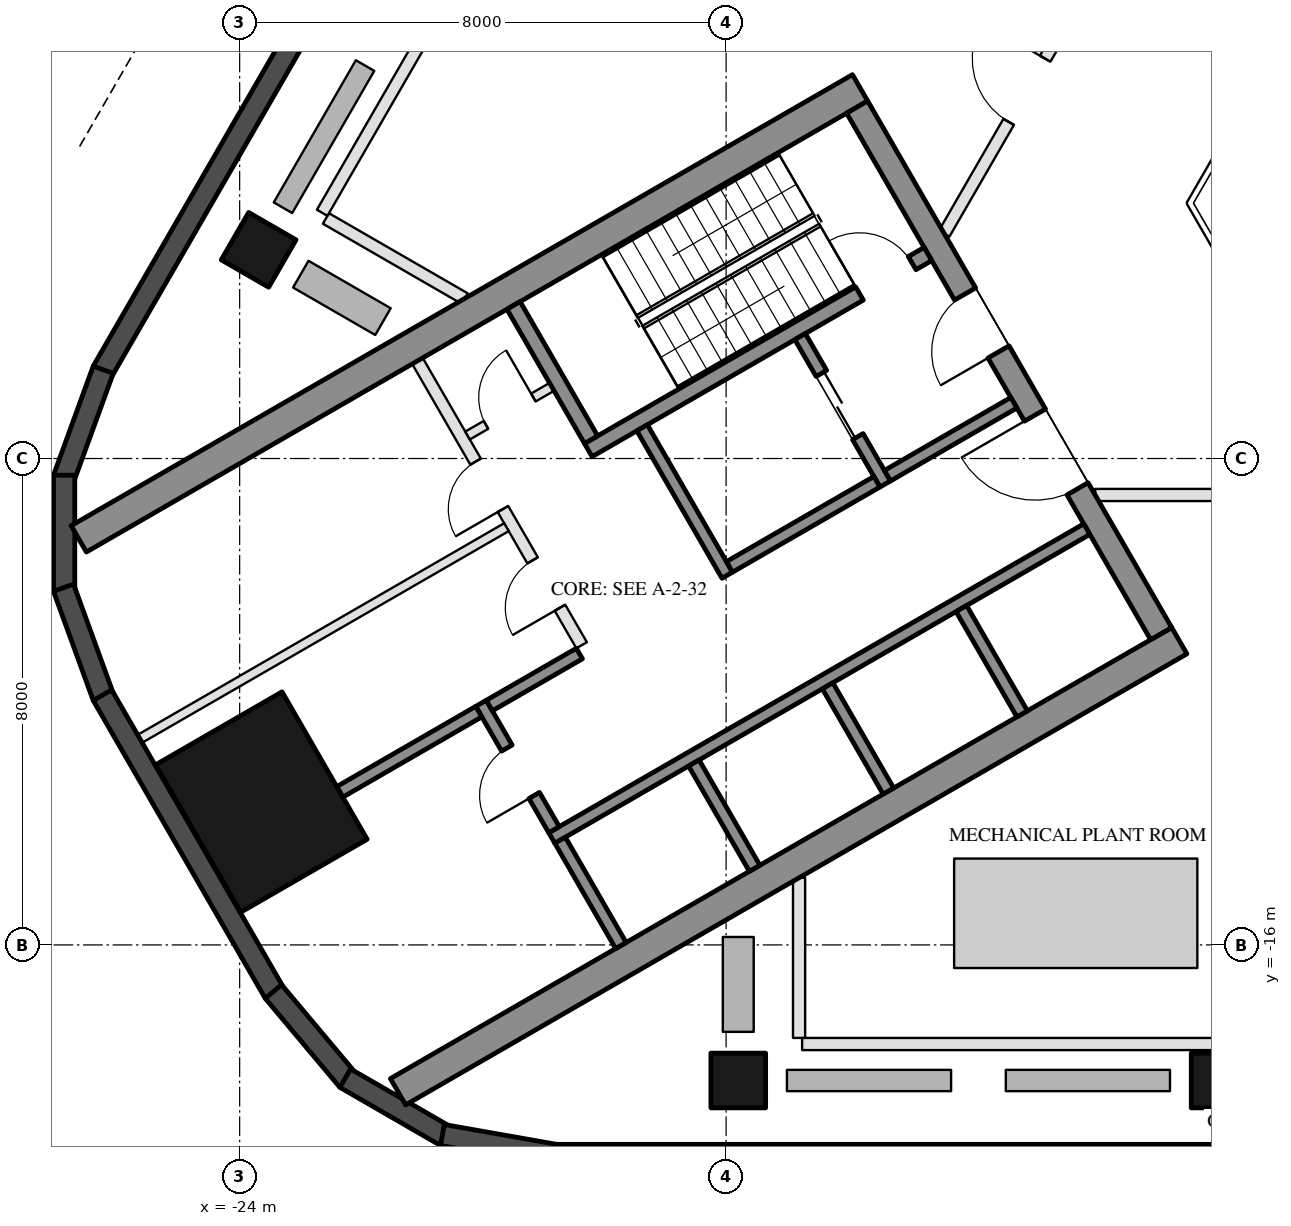
"""IFC4 building model, lengths in metres.
Left out: names, types, materials, properties, quantities, classifications, styles, units other than length and angle.
Written with IfcOpenShell. Run it as: python <this file> out.ifc"""

import sys

from ifc_helpers import new_model, si_unit, direction, frame, frame_2d, origin, origin_2d, place, context, subcontext, project, spatial, rectangle, hollow_rectangle, extrude, element, fill, save


model = new_model("IFC4")
c1 = context("Model", 3, precision=1e-05, world=origin(), true_north=direction((0.0, 1.0)))
c2 = subcontext(c1, "Body", "Model", "MODEL_VIEW")
j1 = project(units=[si_unit("LENGTHUNIT", "METRE"), si_unit("PLANEANGLEUNIT", "RADIAN")], contexts=[c1])
p1 = place(None, origin())
s1 = spatial("IfcSite", under=j1, at=p1, CompositionType="ELEMENT")
p2 = place(p1, origin())
s2 = spatial("IfcBuilding", under=s1, at=p2, CompositionType="ELEMENT")
p3 = place(p2, frame((0.0, 0.0, 142.1)))
s3 = spatial("IfcBuildingStorey", under=s2, at=p3, CompositionType="ELEMENT", Elevation=142.1)
for number, where, z_axis, x_axis in (
    (1, (-15.8, -18.23, 0.0), (0.0, 0.0, 1.0), (-1.0, 0.0, 0.0)),
    (2, (-7.9, -18.23, 0.0), (0.0, 0.0, 1.0), (-1.0, 0.0, 0.0)),
    (3, (-23.688, -4.568, 0.0), (0.0, 0.0, 1.0), (0.5, 0.866, 0.0)),
):
    element("IfcColumn", number, at=place(p3, frame(where, z_axis=z_axis, x_axis=x_axis)), inside=s3, PredefinedType="COLUMN", context=c2, shape_type="SweptSolid", body=[
        extrude(hollow_rectangle(XDim=0.9, YDim=0.9, WallThickness=0.04, at=origin_2d()), origin(), (0.0, 0.0, 1.0), 4.5),
    ])
p4 = place(p3, frame((-23.643, -13.65, 0.0), z_axis=(0.0, 0.0, 1.0), x_axis=(-0.5, 0.866025403784, 0.0)))
e4 = element("IfcColumn", 4, at=p4, inside=s3, PredefinedType="COLUMN", context=c2, shape_type="SweptSolid", body=[
    extrude(hollow_rectangle(XDim=2.8, YDim=2.4, WallThickness=0.07, at=origin_2d()), origin(), (0.0, 0.0, 1.0), 4.5),
])
p5 = place(p3, frame((-7.441, 26.022, 0.0), z_axis=(0.0, 0.0, 1.0), x_axis=(-0.499998380999, -0.866026338513, 0.0)))
e5 = element("IfcWall", 5, at=p5, inside=s3, PredefinedType="SOLIDWALL", context=c2, shape_type="SweptSolid", body=[
    extrude(rectangle(XDim=37.631, YDim=0.35, at=frame_2d((18.816, 0.0))), origin(), (0.0, 0.0, 1.0), 4.35),
])
for number, where, z_axis, x_axis in (
    (6, (-26.244, -6.54, 0.0), (0.0, 0.0, 1.0), (-0.342, -0.94, 0.0)),
    (7, (-26.886, -8.275, 0.0), (0.0, 0.0, 1.0), (0.0, -1.0, 0.0)),
    (8, (-26.897, -10.125, 0.0), (0.0, 0.0, 1.0), (0.342, -0.94, 0.0)),
):
    element("IfcWall", number, at=place(p3, frame(where, z_axis=z_axis, x_axis=x_axis)), inside=s3, PredefinedType="SOLIDWALL", context=c2, shape_type="SweptSolid", body=[
        extrude(rectangle(XDim=1.91, YDim=0.35, at=frame_2d((0.955, 0.0))), origin(), (0.0, 0.0, 1.0), 4.35),
    ])
p6 = place(p3, frame((-26.256, -11.893, 0.0), z_axis=(0.0, 0.0, 1.0), x_axis=(0.499986410639, -0.866033249463, 0.0)))
e9 = element("IfcWall", 9, at=p6, inside=s3, PredefinedType="SOLIDWALL", context=c2, shape_type="SweptSolid", body=[
    extrude(rectangle(XDim=5.658, YDim=0.35, at=frame_2d((2.829, 0.0))), origin(), (0.0, 0.0, 1.0), 4.35),
])
for number, where, z_axis, x_axis in (
    (10, (-23.445, -16.768, 0.0), (0.0, 0.0, 1.0), (0.643, -0.766, 0.0)),
    (11, (-22.264, -18.192, 0.0), (0.0, 0.0, 1.0), (0.866, -0.5, 0.0)),
):
    element("IfcWall", number, at=place(p3, frame(where, z_axis=z_axis, x_axis=x_axis)), inside=s3, PredefinedType="SOLIDWALL", context=c2, shape_type="SweptSolid", body=[
        extrude(rectangle(XDim=1.91, YDim=0.35, at=frame_2d((0.955, 0.0))), origin(), (0.0, 0.0, 1.0), 4.35),
    ])
p7 = place(p3, frame((-20.667, -19.126, 0.0), z_axis=(0.0, 0.0, 1.0), x_axis=(0.984798995425, -0.173697837091, 0.0)))
e12 = element("IfcWall", 12, at=p7, inside=s3, PredefinedType="SOLIDWALL", context=c2, shape_type="SweptSolid", body=[
    extrude(rectangle(XDim=1.91, YDim=0.35, at=frame_2d((0.955, 0.0))), origin(), (0.0, 0.0, 1.0), 4.35),
])
p8 = place(p3, frame((-18.816, -19.455, 0.0), z_axis=(0.0, 0.0, 1.0), x_axis=(1.0, 0.0, 0.0)))
e13 = element("IfcWall", 13, at=p8, inside=s3, PredefinedType="SOLIDWALL", context=c2, shape_type="SweptSolid", body=[
    extrude(rectangle(XDim=37.632, YDim=0.35, at=frame_2d((18.816, 0.0))), origin(), (0.0, 0.0, 1.0), 4.35),
])
for number, where, z_axis, x_axis in (
    (14, (-13.797, -1.903, 0.0), (0.0, 0.0, 1.0), (-0.866, -0.5, 0.0)),
    (15, (-8.547, -10.997, 0.0), (0.0, 0.0, 1.0), (-0.866, -0.5, 0.0)),
):
    element("IfcWall", number, at=place(p3, frame(where, z_axis=z_axis, x_axis=x_axis)), inside=s3, PredefinedType="SHEAR", context=c2, shape_type="SweptSolid", body=[
        extrude(rectangle(XDim=14.837, YDim=0.5, at=frame_2d((7.418, 0.0))), origin(), (0.0, 0.0, 1.0), 4.3),
    ])
p9 = place(p3, frame((-13.845, -2.22, 0.0), z_axis=(0.0, 0.0, 1.0), x_axis=(0.500004234368, -0.866022959057, 0.0)))
e16 = element("IfcWall", 16, at=p9, inside=s3, PredefinedType="SHEAR", context=c2, shape_type="SweptSolid", body=[
    extrude(rectangle(XDim=10.0, YDim=0.4, at=frame_2d((5.0, 0.0))), origin(), (0.0, 0.0, 1.0), 4.3),
])
p10 = place(p9, frame((3.55, 0.0, 0.0)))
e17 = element("IfcOpeningElement", 17, at=p10, cuts=e16, PredefinedType="OPENING", context=c2, shape_type="SweptSolid", body=[
    extrude(rectangle(XDim=1.1, YDim=2.1, at=frame_2d((0.55, 1.05))), frame((0.0, 0.21, 0.0), z_axis=(0.0, -1.0, 0.0), x_axis=(1.0, 0.0, 0.0)), (0.0, 0.0, 1.0), 0.42),
])
p11 = place(p9, frame((5.85, 0.0, 0.0)))
e18 = element("IfcOpeningElement", 18, at=p11, cuts=e16, PredefinedType="OPENING", context=c2, shape_type="SweptSolid", body=[
    extrude(rectangle(XDim=1.4, YDim=2.1, at=frame_2d((0.7, 1.05))), frame((0.0, 0.21, 0.0), z_axis=(0.0, -1.0, 0.0), x_axis=(1.0, 0.0, 0.0)), (0.0, 0.0, 1.0), 0.42),
])
p12 = place(p3, frame((-12.681, -4.636, 0.0), z_axis=(0.0, 0.0, 1.0), x_axis=(-0.866021702275, -0.500006411147, 0.0)))
e19 = element("IfcWall", 19, at=p12, inside=s3, PredefinedType="SHEAR", context=c2, shape_type="SweptSolid", body=[
    extrude(rectangle(XDim=6.45, YDim=0.25, at=frame_2d((3.225, 0.0))), origin(), (0.0, 0.0, 1.0), 4.3),
])
p13 = place(p12, frame((0.3, 0.0, 0.0)))
e20 = element("IfcOpeningElement", 20, at=p13, cuts=e19, PredefinedType="OPENING", context=c2, shape_type="SweptSolid", body=[
    extrude(rectangle(XDim=1.0, YDim=2.1, at=frame_2d((0.5, 1.05))), frame((0.0, 0.135, 0.0), z_axis=(0.0, -1.0, 0.0), x_axis=(1.0, 0.0, 0.0)), (0.0, 0.0, 1.0), 0.27),
])
p14 = place(p3, frame((-19.496, -5.482, 0.0), z_axis=(0.0, 0.0, 1.0), x_axis=(0.499990435942, -0.866030925526, 0.0)))
e21 = element("IfcWall", 21, at=p14, inside=s3, PredefinedType="SHEAR", context=c2, shape_type="SweptSolid", body=[
    extrude(rectangle(XDim=2.55, YDim=0.25, at=frame_2d((1.275, 0.0))), origin(), (0.0, 0.0, 1.0), 4.3),
])
p15 = place(p3, frame((-17.381, -7.495, 0.0), z_axis=(0.0, 0.0, 1.0), x_axis=(0.500011755427, -0.866018616679, 0.0)))
e22 = element("IfcWall", 22, at=p15, inside=s3, PredefinedType="SHEAR", context=c2, shape_type="SweptSolid", body=[
    extrude(rectangle(XDim=2.8, YDim=0.2, at=frame_2d((1.4, 0.0))), origin(), (0.0, 0.0, 1.0), 4.3),
])
p16 = place(p3, frame((-14.783, -5.995, 0.0), z_axis=(0.0, 0.0, 1.0), x_axis=(0.49994636267, -0.866056369097, 0.0)))
e23 = element("IfcWall", 23, at=p16, inside=s3, PredefinedType="SHEAR", context=c2, shape_type="SweptSolid", body=[
    extrude(rectangle(XDim=2.8, YDim=0.2, at=frame_2d((1.4, 0.0))), origin(), (0.0, 0.0, 1.0), 4.3),
])
p17 = place(p16, frame((0.7, 0.0, 0.0)))
e24 = element("IfcOpeningElement", 24, at=p17, cuts=e23, PredefinedType="OPENING", context=c2, shape_type="SweptSolid", body=[
    extrude(rectangle(XDim=1.2, YDim=2.1, at=frame_2d((0.6, 1.05))), frame((0.0, 0.11, 0.0), z_axis=(0.0, -1.0, 0.0), x_axis=(1.0, 0.0, 0.0)), (0.0, 0.0, 1.0), 0.22),
])
p18 = place(p3, frame((-13.52, -8.383, 0.0), z_axis=(0.0, 0.0, 1.0), x_axis=(-0.866034573852, -0.49998411664, 0.0)))
e25 = element("IfcWall", 25, at=p18, inside=s3, PredefinedType="SHEAR", context=c2, shape_type="SweptSolid", body=[
    extrude(rectangle(XDim=2.8, YDim=0.2, at=frame_2d((1.4, 0.0))), origin(), (0.0, 0.0, 1.0), 4.3),
])
p19 = place(p3, frame((-11.268, -7.083, 0.0), z_axis=(0.0, 0.0, 1.0), x_axis=(-0.866050077142, -0.499957262057, 0.0)))
e26 = element("IfcWall", 26, at=p19, inside=s3, PredefinedType="SHEAR", context=c2, shape_type="SweptSolid", body=[
    extrude(rectangle(XDim=2.4, YDim=0.2, at=frame_2d((1.2, 0.0))), origin(), (0.0, 0.0, 1.0), 4.3),
])
p20 = place(p3, frame((-10.068, -9.162, 0.0), z_axis=(0.0, 0.0, 1.0), x_axis=(-0.866032725843, -0.499987317609, 0.0)))
e27 = element("IfcWall", 27, at=p20, inside=s3, PredefinedType="SHEAR", context=c2, shape_type="SweptSolid", body=[
    extrude(rectangle(XDim=10.16, YDim=0.2, at=frame_2d((5.08, 0.0))), origin(), (0.0, 0.0, 1.0), 4.3),
])
p21 = place(p3, frame((-20.031, -12.026, 0.0), z_axis=(0.0, 0.0, 1.0), x_axis=(0.500033551112, -0.866006032174, 0.0)))
e28 = element("IfcWall", 28, at=p21, inside=s3, PredefinedType="SHEAR", context=c2, shape_type="SweptSolid", body=[
    extrude(rectangle(XDim=2.4, YDim=0.2, at=frame_2d((1.2, 0.0))), origin(), (0.0, 0.0, 1.0), 4.3),
])
p22 = place(p21, frame((0.85, 0.0, 0.0)))
e29 = element("IfcOpeningElement", 29, at=p22, cuts=e28, PredefinedType="OPENING", context=c2, shape_type="SweptSolid", body=[
    extrude(rectangle(XDim=0.9, YDim=2.1, at=frame_2d((0.45, 1.05))), frame((0.0, 0.11, 0.0), z_axis=(0.0, -1.0, 0.0), x_axis=(1.0, 0.0, 0.0)), (0.0, 0.0, 1.0), 0.22),
])
p23 = place(p3, frame((-18.413, -11.208, 0.0), z_axis=(0.0, 0.0, 1.0), x_axis=(-0.866038183914, -0.499977863513, 0.0)))
e30 = element("IfcWall", 30, at=p23, inside=s3, PredefinedType="SHEAR", context=c2, shape_type="SweptSolid", body=[
    extrude(rectangle(XDim=1.71, YDim=0.2, at=frame_2d((0.855, 0.0))), origin(), (0.0, 0.0, 1.0), 4.3),
])
for number, where, z_axis, x_axis in (
    (31, (-12.131, -10.468, 0.0), (0.0, 0.0, 1.0), (0.5, -0.866, 0.0)),
    (32, (-14.331, -11.738, 0.0), (0.0, 0.0, 1.0), (0.5, -0.866, 0.0)),
    (33, (-16.531, -13.008, 0.0), (0.0, 0.0, 1.0), (0.5, -0.866, 0.0)),
    (34, (-18.73, -14.278, 0.0), (0.0, 0.0, 1.0), (0.5, -0.866, 0.0)),
):
    element("IfcWall", number, at=place(p3, frame(where, z_axis=z_axis, x_axis=x_axis)), inside=s3, PredefinedType="SHEAR", context=c2, shape_type="SweptSolid", body=[
        extrude(rectangle(XDim=2.0, YDim=0.2, at=frame_2d((1.0, 0.0))), origin(), (0.0, 0.0, 1.0), 4.3),
    ])
p24 = place(p3, frame((-20.067, -12.163, 0.0), z_axis=(0.0, 0.0, 1.0), x_axis=(-0.866060851709, -0.499938597367, 0.0)))
e35 = element("IfcWall", 35, at=p24, inside=s3, PredefinedType="SHEAR", context=c2, shape_type="SweptSolid", body=[
    extrude(rectangle(XDim=2.64, YDim=0.2, at=frame_2d((1.32, 0.0))), origin(), (0.0, 0.0, 1.0), 4.3),
])
p25 = place(p3, frame((-21.076, -6.395, 0.0), z_axis=(0.0, 0.0, 1.0), x_axis=(0.50001468107, -0.866016927499, 0.0)))
e36 = element("IfcWall", 36, at=p25, inside=s3, PredefinedType="PARTITIONING", context=c2, shape_type="SweptSolid", body=[
    extrude(rectangle(XDim=5.4, YDim=0.2, at=frame_2d((2.7, 0.0))), origin(), (0.0, 0.0, 1.0), 4.3),
])
p26 = place(p25, frame((1.913, 0.0, 0.0)))
e37 = element("IfcOpeningElement", 37, at=p26, cuts=e36, PredefinedType="OPENING", context=c2, shape_type="SweptSolid", body=[
    extrude(rectangle(XDim=0.9, YDim=2.1, at=frame_2d((0.45, 1.05))), frame((0.0, 0.11, 0.0), z_axis=(0.0, -1.0, 0.0), x_axis=(1.0, 0.0, 0.0)), (0.0, 0.0, 1.0), 0.22),
])
p27 = place(p25, frame((3.788, 0.0, 0.0)))
e38 = element("IfcOpeningElement", 38, at=p27, cuts=e36, PredefinedType="OPENING", context=c2, shape_type="SweptSolid", body=[
    extrude(rectangle(XDim=0.9, YDim=2.1, at=frame_2d((0.45, 1.05))), frame((0.0, 0.11, 0.0), z_axis=(0.0, -1.0, 0.0), x_axis=(1.0, 0.0, 0.0)), (0.0, 0.0, 1.0), 0.22),
])
p28 = place(p3, frame((-18.866, -6.822, 0.0), z_axis=(0.0, 0.0, 1.0), x_axis=(-0.866028054938, -0.499995408039, 0.0)))
e39 = element("IfcWall", 39, at=p28, inside=s3, PredefinedType="PARTITIONING", context=c2, shape_type="SweptSolid", body=[
    extrude(rectangle(XDim=1.6, YDim=0.15, at=frame_2d((0.8, 0.0))), origin(), (0.0, 0.0, 1.0), 4.3),
])
p29 = place(p28, frame((0.35, 0.0, 0.0)))
e40 = element("IfcOpeningElement", 40, at=p29, cuts=e39, PredefinedType="OPENING", context=c2, shape_type="SweptSolid", body=[
    extrude(rectangle(XDim=0.9, YDim=2.1, at=frame_2d((0.45, 1.05))), frame((0.0, 0.085, 0.0), z_axis=(0.0, -1.0, 0.0), x_axis=(1.0, 0.0, 0.0)), (0.0, 0.0, 1.0), 0.17),
])
p30 = place(p3, frame((-19.613, -9.13, 0.0), z_axis=(0.0, 0.0, 1.0), x_axis=(-0.866031734426, -0.499989034847, 0.0)))
e41 = element("IfcWall", 41, at=p30, inside=s3, PredefinedType="PARTITIONING", context=c2, shape_type="SweptSolid", body=[
    extrude(rectangle(XDim=6.95, YDim=0.15, at=frame_2d((3.475, 0.0))), origin(), (0.0, 0.0, 1.0), 4.3),
])
p31 = place(p3, frame((-14.8, -17.53, 0.0), z_axis=(0.0, 0.0, 1.0), x_axis=(0.0, 1.0, 0.0)))
e42 = element("IfcWall", 42, at=p31, inside=s3, PredefinedType="PARTITIONING", context=c2, shape_type="SweptSolid", body=[
    extrude(rectangle(XDim=2.635, YDim=0.2, at=frame_2d((1.317, 0.0))), origin(), (0.0, 0.0, 1.0), 4.35),
])
p32 = place(p3, frame((-14.75, -17.63, 0.0), z_axis=(0.0, 0.0, 1.0), x_axis=(1.0, 0.0, 0.0)))
e43 = element("IfcWall", 43, at=p32, inside=s3, PredefinedType="PARTITIONING", context=c2, shape_type="SweptSolid", body=[
    extrude(rectangle(XDim=29.5, YDim=0.2, at=frame_2d((14.75, 0.0))), origin(), (0.0, 0.0, 1.0), 3.75),
])
p33 = place(p3, frame((-9.93, -8.6, 0.0), z_axis=(0.0, 0.0, 1.0), x_axis=(1.0, 0.0, 0.0)))
e44 = element("IfcWall", 44, at=p33, inside=s3, PredefinedType="PARTITIONING", context=c2, shape_type="SweptSolid", body=[
    extrude(rectangle(XDim=19.861, YDim=0.2, at=frame_2d((9.93, 0.0))), origin(), (0.0, 0.0, 1.0), 3.75),
])
p34 = place(p33, frame((2.621, 0.0, 0.0)))
e45 = element("IfcOpeningElement", 45, at=p34, cuts=e44, PredefinedType="OPENING", context=c2, shape_type="SweptSolid", body=[
    extrude(rectangle(XDim=1.2, YDim=2.1, at=frame_2d((0.6, 1.05))), frame((0.0, 0.11, 0.0), z_axis=(0.0, -1.0, 0.0), x_axis=(1.0, 0.0, 0.0)), (0.0, 0.0, 1.0), 0.22),
])
p35 = place(p33, frame((9.581, 0.0, 0.0)))
e46 = element("IfcOpeningElement", 46, at=p35, cuts=e44, PredefinedType="OPENING", context=c2, shape_type="SweptSolid", body=[
    extrude(rectangle(XDim=1.2, YDim=2.1, at=frame_2d((0.6, 1.05))), frame((0.0, 0.11, 0.0), z_axis=(0.0, -1.0, 0.0), x_axis=(1.0, 0.0, 0.0)), (0.0, 0.0, 1.0), 0.22),
])
p36 = place(p33, frame((16.29, 0.0, 0.0)))
e47 = element("IfcOpeningElement", 47, at=p36, cuts=e44, PredefinedType="OPENING", context=c2, shape_type="SweptSolid", body=[
    extrude(rectangle(XDim=1.2, YDim=2.1, at=frame_2d((0.6, 1.05))), frame((0.0, 0.11, 0.0), z_axis=(0.0, -1.0, 0.0), x_axis=(1.0, 0.0, 0.0)), (0.0, 0.0, 1.0), 0.22),
])
p37 = place(p3, frame((-22.581, -4.052, 0.0), z_axis=(0.0, 0.0, 1.0), x_axis=(0.866038977738, -0.499976488486, 0.0)))
e48 = element("IfcWall", 48, at=p37, inside=s3, PredefinedType="PARTITIONING", context=c2, shape_type="SweptSolid", body=[
    extrude(rectangle(XDim=2.635, YDim=0.2, at=frame_2d((1.317, 0.0))), origin(), (0.0, 0.0, 1.0), 4.35),
])
p38 = place(p3, frame((-7.893, 21.589, 0.0), z_axis=(0.0, 0.0, 1.0), x_axis=(-0.499998500593, -0.866026269466, 0.0)))
e49 = element("IfcWall", 49, at=p38, inside=s3, PredefinedType="PARTITIONING", context=c2, shape_type="SweptSolid", body=[
    extrude(rectangle(XDim=29.5, YDim=0.2, at=frame_2d((14.75, 0.0))), origin(), (0.0, 0.0, 1.0), 3.75),
])
p39 = place(p3, frame((-2.482, 12.9, 0.0), z_axis=(0.0, 0.0, 1.0), x_axis=(-0.50000478328, -0.866022642139, 0.0)))
e50 = element("IfcWall", 50, at=p39, inside=s3, PredefinedType="PARTITIONING", context=c2, shape_type="SweptSolid", body=[
    extrude(rectangle(XDim=19.861, YDim=0.2, at=frame_2d((9.931, 0.0))), origin(), (0.0, 0.0, 1.0), 3.75),
])
p40 = place(p39, frame((3.371, 0.0, 0.0)))
e51 = element("IfcOpeningElement", 51, at=p40, cuts=e50, PredefinedType="OPENING", context=c2, shape_type="SweptSolid", body=[
    extrude(rectangle(XDim=1.2, YDim=2.1, at=frame_2d((0.6, 1.05))), frame((0.0, 0.11, 0.0), z_axis=(0.0, -1.0, 0.0), x_axis=(1.0, 0.0, 0.0)), (0.0, 0.0, 1.0), 0.22),
])
p41 = place(p39, frame((10.581, 0.0, 0.0)))
e52 = element("IfcOpeningElement", 52, at=p41, cuts=e50, PredefinedType="OPENING", context=c2, shape_type="SweptSolid", body=[
    extrude(rectangle(XDim=1.2, YDim=2.1, at=frame_2d((0.6, 1.05))), frame((0.0, 0.11, 0.0), z_axis=(0.0, -1.0, 0.0), x_axis=(1.0, 0.0, 0.0)), (0.0, 0.0, 1.0), 0.22),
])
p42 = place(p39, frame((16.54, 0.0, 0.0)))
e53 = element("IfcOpeningElement", 53, at=p42, cuts=e50, PredefinedType="OPENING", context=c2, shape_type="SweptSolid", body=[
    extrude(rectangle(XDim=1.2, YDim=2.1, at=frame_2d((0.6, 1.05))), frame((0.0, 0.11, 0.0), z_axis=(0.0, -1.0, 0.0), x_axis=(1.0, 0.0, 0.0)), (0.0, 0.0, 1.0), 0.22),
])
p43 = place(p17, origin())
e54 = element("IfcDoor", 54, at=p43, inside=s3, OperationType="DOUBLE_DOOR_SLIDING", PredefinedType="DOOR", context=c2, shape_type="SweptSolid", body=[
    extrude(rectangle(XDim=1.2, YDim=2.1, at=frame_2d((0.6, 1.05))), frame((0.0, 0.025, 0.0), z_axis=(0.0, -1.0, 0.0), x_axis=(1.0, 0.0, 0.0)), (0.0, 0.0, 1.0), 0.05),
])
fill(e24, e54)
p44 = place(p29, frame((0.9, 0.0, 0.0), z_axis=(0.0, 0.0, 1.0), x_axis=(-1.0, 0.0, 0.0)))
e55 = element("IfcDoor", 55, at=p44, inside=s3, OperationType="SINGLE_SWING_RIGHT", PredefinedType="DOOR", context=c2, shape_type="SweptSolid", body=[
    extrude(rectangle(XDim=0.9, YDim=2.1, at=frame_2d((0.45, 1.05))), frame((0.0, 0.025, 0.0), z_axis=(0.0, -1.0, 0.0), x_axis=(1.0, 0.0, 0.0)), (0.0, 0.0, 1.0), 0.05),
])
fill(e40, e55)
p45 = place(p22, frame((0.9, 0.0, 0.0), z_axis=(0.0, 0.0, 1.0), x_axis=(-1.0, 0.0, 0.0)))
e56 = element("IfcDoor", 56, at=p45, inside=s3, OperationType="SINGLE_SWING_LEFT", PredefinedType="DOOR", context=c2, shape_type="SweptSolid", body=[
    extrude(rectangle(XDim=0.9, YDim=2.1, at=frame_2d((0.45, 1.05))), frame((0.0, 0.025, 0.0), z_axis=(0.0, -1.0, 0.0), x_axis=(1.0, 0.0, 0.0)), (0.0, 0.0, 1.0), 0.05),
])
fill(e29, e56)
p46 = place(p26, frame((0.9, 0.0, 0.0), z_axis=(0.0, 0.0, 1.0), x_axis=(-1.0, 0.0, 0.0)))
e57 = element("IfcDoor", 57, at=p46, inside=s3, OperationType="SINGLE_SWING_LEFT", PredefinedType="DOOR", context=c2, shape_type="SweptSolid", body=[
    extrude(rectangle(XDim=0.9, YDim=2.1, at=frame_2d((0.45, 1.05))), frame((0.0, 0.025, 0.0), z_axis=(0.0, -1.0, 0.0), x_axis=(1.0, 0.0, 0.0)), (0.0, 0.0, 1.0), 0.05),
])
fill(e37, e57)
p47 = place(p27, frame((0.9, 0.0, 0.0), z_axis=(0.0, 0.0, 1.0), x_axis=(-1.0, 0.0, 0.0)))
e58 = element("IfcDoor", 58, at=p47, inside=s3, OperationType="SINGLE_SWING_LEFT", PredefinedType="DOOR", context=c2, shape_type="SweptSolid", body=[
    extrude(rectangle(XDim=0.9, YDim=2.1, at=frame_2d((0.45, 1.05))), frame((0.0, 0.025, 0.0), z_axis=(0.0, -1.0, 0.0), x_axis=(1.0, 0.0, 0.0)), (0.0, 0.0, 1.0), 0.05),
])
fill(e38, e58)
p48 = place(p10, frame((1.1, 0.0, 0.0), z_axis=(0.0, 0.0, 1.0), x_axis=(-1.0, 0.0, 0.0)))
e59 = element("IfcDoor", 59, at=p48, inside=s3, OperationType="SINGLE_SWING_LEFT", PredefinedType="DOOR", context=c2, shape_type="SweptSolid", body=[
    extrude(rectangle(XDim=1.1, YDim=2.1, at=frame_2d((0.55, 1.05))), frame((0.0, 0.025, 0.0), z_axis=(0.0, -1.0, 0.0), x_axis=(1.0, 0.0, 0.0)), (0.0, 0.0, 1.0), 0.05),
])
fill(e17, e59)
p49 = place(p11, frame((1.4, 0.0, 0.0), z_axis=(0.0, 0.0, 1.0), x_axis=(-1.0, 0.0, 0.0)))
e60 = element("IfcDoor", 60, at=p49, inside=s3, OperationType="DOUBLE_DOOR_SINGLE_SWING", PredefinedType="DOOR", context=c2, shape_type="SweptSolid", body=[
    extrude(rectangle(XDim=1.4, YDim=2.1, at=frame_2d((0.7, 1.05))), frame((0.0, 0.025, 0.0), z_axis=(0.0, -1.0, 0.0), x_axis=(1.0, 0.0, 0.0)), (0.0, 0.0, 1.0), 0.05),
])
fill(e18, e60)
p50 = place(p13, frame((1.0, 0.0, 0.0), z_axis=(0.0, 0.0, 1.0), x_axis=(-1.0, 0.0, 0.0)))
e61 = element("IfcDoor", 61, at=p50, inside=s3, OperationType="SINGLE_SWING_LEFT", PredefinedType="DOOR", context=c2, shape_type="SweptSolid", body=[
    extrude(rectangle(XDim=1.0, YDim=2.1, at=frame_2d((0.5, 1.05))), frame((0.0, 0.025, 0.0), z_axis=(0.0, -1.0, 0.0), x_axis=(1.0, 0.0, 0.0)), (0.0, 0.0, 1.0), 0.05),
])
fill(e20, e61)
p51 = place(p42, frame((1.2, 0.0, 0.0), z_axis=(0.0, 0.0, 1.0), x_axis=(-1.0, 0.0, 0.0)))
e62 = element("IfcDoor", 62, at=p51, inside=s3, OperationType="SINGLE_SWING_RIGHT", PredefinedType="DOOR", context=c2, shape_type="SweptSolid", body=[
    extrude(rectangle(XDim=1.2, YDim=2.1, at=frame_2d((0.6, 1.05))), frame((0.0, 0.025, 0.0), z_axis=(0.0, -1.0, 0.0), x_axis=(1.0, 0.0, 0.0)), (0.0, 0.0, 1.0), 0.05),
])
fill(e53, e62)
save(model, sys.argv[1])
